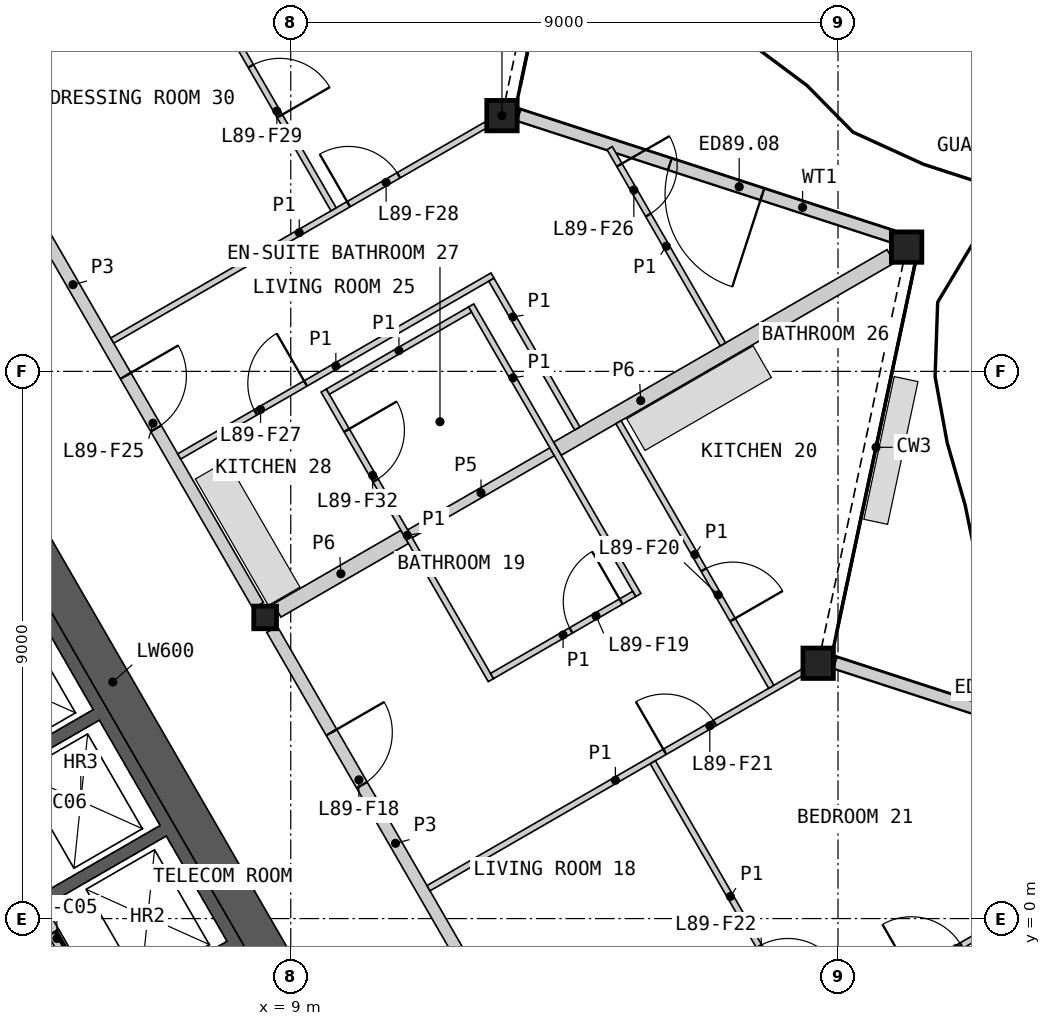
"""IFC4 building model, lengths in metres.
Left out: names, types, materials, properties, quantities, classifications, styles, units other than length and angle.
Written with IfcOpenShell. Run it as: python <this file> out.ifc"""

import sys

from ifc_helpers import new_model, si_unit, direction, frame, frame_2d, origin, origin_2d, place, context, subcontext, project, spatial, polyline, rectangle, hollow_rectangle, i_section, outline, extrude, element, fill, save


model = new_model("IFC4")
c1 = context("Model", 3, precision=1e-05, world=origin(), true_north=direction((0.0, 1.0)))
c2 = subcontext(c1, "Body", "Model", "MODEL_VIEW")
j1 = project(units=[si_unit("LENGTHUNIT", "METRE"), si_unit("PLANEANGLEUNIT", "RADIAN")], contexts=[c1])
p1 = place(None, origin())
s1 = spatial("IfcSite", under=j1, at=p1, CompositionType="ELEMENT")
p2 = place(p1, origin())
s2 = spatial("IfcBuilding", under=s1, at=p2, CompositionType="ELEMENT")
p3 = place(p2, frame((0.0, 0.0, 391.6)))
s3 = spatial("IfcBuildingStorey", under=s2, at=p3, CompositionType="ELEMENT", Elevation=391.6)
for number, where, z_axis, x_axis in (
    (1, (17.674, 4.199, 0.0), (0.0, 0.0, 1.0), (1.0, 0.0, 0.0)),
    (2, (19.129, 11.044, 0.0), (0.0, 0.0, 1.0), (1.0, 0.0, 0.0)),
    (3, (12.474, 13.206, 0.0), (0.0, 0.0, 1.0), (1.0, 0.0, 0.0)),
):
    element("IfcColumn", number, at=place(p3, frame(where, z_axis=z_axis, x_axis=x_axis)), inside=s3, PredefinedType="COLUMN", context=c2, shape_type="SweptSolid", body=[
        extrude(hollow_rectangle(XDim=0.5, YDim=0.5, WallThickness=0.03, at=origin_2d()), origin(), (0.0, 0.0, 1.0), 3.4),
    ])
p4 = place(p3, frame((8.578, 4.953, 0.0), z_axis=(0.0, 0.0, 1.0), x_axis=(1.0, 0.0, 0.0)))
e4 = element("IfcColumn", 4, at=p4, inside=s3, PredefinedType="COLUMN", context=c2, shape_type="SweptSolid", body=[
    extrude(i_section(OverallWidth=0.374, OverallDepth=0.372, WebThickness=0.016, FlangeThickness=0.026, at=origin_2d()), origin(), (0.0, 0.0, 1.0), 3.4),
])
p5 = place(p3, frame((24.174, 2.185, 0.0), z_axis=(0.0, 0.0, 1.0), x_axis=(-0.951061473407, 0.309001737536, 0.0)))
e5 = element("IfcWall", 5, at=p5, inside=s3, PredefinedType="SOLIDWALL", context=c2, shape_type="SweptSolid", body=[
    extrude(rectangle(XDim=6.546, YDim=0.2, at=frame_2d((3.273, 0.0))), origin(), (0.0, 0.0, 1.0), 2.634),
])
p6 = place(p5, frame((2.333, 0.0, 0.0)))
e6 = element("IfcOpeningElement", 6, at=p6, cuts=e5, PredefinedType="OPENING", context=c2, shape_type="SweptSolid", body=[
    extrude(rectangle(XDim=1.6, YDim=2.25, at=frame_2d((0.8, 1.125))), frame((0.0, 0.11, 0.0), z_axis=(0.0, -1.0, 0.0), x_axis=(1.0, 0.0, 0.0)), (0.0, 0.0, 1.0), 0.22),
])
p7 = place(p3, frame((18.974, 11.191, 0.0), z_axis=(0.0, 0.0, 1.0), x_axis=(-0.951057912068, 0.309012698595, 0.0)))
e7 = element("IfcWall", 7, at=p7, inside=s3, PredefinedType="SOLIDWALL", context=c2, shape_type="SweptSolid", body=[
    extrude(rectangle(XDim=6.546, YDim=0.2, at=frame_2d((3.273, 0.0))), origin(), (0.0, 0.0, 1.0), 2.634),
])
p8 = place(p7, frame((2.333, 0.0, 0.0)))
e8 = element("IfcOpeningElement", 8, at=p8, cuts=e7, PredefinedType="OPENING", context=c2, shape_type="SweptSolid", body=[
    extrude(rectangle(XDim=1.6, YDim=2.25, at=frame_2d((0.8, 1.125))), frame((0.0, 0.11, 0.0), z_axis=(0.0, -1.0, 0.0), x_axis=(1.0, 0.0, 0.0)), (0.0, 0.0, 1.0), 0.22),
])
p9 = place(p3, origin())
e9 = element("IfcWall", 9, at=p9, inside=s3, PredefinedType="SHEAR", context=c2, shape_type="SweptSolid", body=[
    extrude(outline(polyline([(1.561, 6.097), (3.731, 7.35), (8.231, -0.444), (6.061, -1.697), (5.96, -1.524), (7.952, -0.374), (6.952, 1.358), (4.96, 0.208), (4.861, 0.381), (6.852, 1.531), (5.852, 3.263), (3.861, 2.113), (3.76, 2.287), (5.752, 3.437), (4.752, 5.169), (2.76, 4.019), (2.66, 4.192), (4.652, 5.342), (3.652, 7.074), (1.66, 5.924), (1.561, 6.097)])), origin(), (0.0, 0.0, 1.0), 3.1),
])
p10 = place(p3, frame((5.817, -1.476, 0.0), z_axis=(0.0, 0.0, 1.0), x_axis=(-0.500002616675, 0.866023893041, 0.0)))
e10 = element("IfcWall", 10, at=p10, inside=s3, PredefinedType="SOLIDWALL", context=c2, shape_type="SweptSolid", body=[
    extrude(rectangle(XDim=8.373, YDim=0.2, at=frame_2d((4.187, 0.0))), origin(), (0.0, 0.0, 1.0), 3.1),
])
p11 = place(p10, frame((0.337, 0.0, 0.0)))
e11 = element("IfcOpeningElement", 11, at=p11, cuts=e10, PredefinedType="OPENING", context=c2, shape_type="SweptSolid", body=[
    extrude(rectangle(XDim=1.1, YDim=2.1, at=frame_2d((0.55, 1.05))), frame((0.0, 0.11, 0.0), z_axis=(0.0, -1.0, 0.0), x_axis=(1.0, 0.0, 0.0)), (0.0, 0.0, 1.0), 0.22),
])
p12 = place(p10, frame((2.537, 0.0, 0.0)))
e12 = element("IfcOpeningElement", 12, at=p12, cuts=e10, PredefinedType="OPENING", context=c2, shape_type="SweptSolid", body=[
    extrude(rectangle(XDim=1.1, YDim=2.1, at=frame_2d((0.55, 1.05))), frame((0.0, 0.11, 0.0), z_axis=(0.0, -1.0, 0.0), x_axis=(1.0, 0.0, 0.0)), (0.0, 0.0, 1.0), 0.22),
])
p13 = place(p10, frame((4.737, 0.0, 0.0)))
e13 = element("IfcOpeningElement", 13, at=p13, cuts=e10, PredefinedType="OPENING", context=c2, shape_type="SweptSolid", body=[
    extrude(rectangle(XDim=1.1, YDim=2.1, at=frame_2d((0.55, 1.05))), frame((0.0, 0.11, 0.0), z_axis=(0.0, -1.0, 0.0), x_axis=(1.0, 0.0, 0.0)), (0.0, 0.0, 1.0), 0.22),
])
p14 = place(p10, frame((7.037, 0.0, 0.0)))
e14 = element("IfcOpeningElement", 14, at=p14, cuts=e10, PredefinedType="OPENING", context=c2, shape_type="SweptSolid", body=[
    extrude(rectangle(XDim=0.9, YDim=2.1, at=frame_2d((0.45, 1.05))), frame((0.0, 0.11, 0.0), z_axis=(0.0, -1.0, 0.0), x_axis=(1.0, 0.0, 0.0)), (0.0, 0.0, 1.0), 0.22),
])
p15 = place(p3, frame((8.686, -0.634, 0.0), z_axis=(0.0, 0.0, 1.0), x_axis=(-0.50001836461, 0.866014800712, 0.0)))
e15 = element("IfcWall", 15, at=p15, inside=s3, PredefinedType="SHEAR", context=c2, shape_type="SweptSolid", body=[
    extrude(rectangle(XDim=10.451, YDim=0.6, at=frame_2d((5.225, 0.0))), origin(), (0.0, 0.0, 1.0), 3.1),
])
p16 = place(p3, frame((4.403, 12.185, 0.0), z_axis=(0.0, 0.0, 1.0), x_axis=(0.499992155518, -0.866029932751, 0.0)))
e16 = element("IfcWall", 16, at=p16, inside=s3, PredefinedType="PARTITIONING", context=c2, shape_type="SweptSolid", body=[
    extrude(rectangle(XDim=8.123, YDim=0.2, at=frame_2d((4.062, 0.0))), origin(), (0.0, 0.0, 1.0), 3.1),
])
p17 = place(p16, frame((3.762, 0.0, 0.0)))
e17 = element("IfcOpeningElement", 17, at=p17, cuts=e16, PredefinedType="OPENING", context=c2, shape_type="SweptSolid", body=[
    extrude(rectangle(XDim=1.0, YDim=2.1, at=frame_2d((0.5, 1.05))), frame((0.0, 0.11, 0.0), z_axis=(0.0, -1.0, 0.0), x_axis=(1.0, 0.0, 0.0)), (0.0, 0.0, 1.0), 0.22),
])
p18 = place(p3, frame((8.692, 4.756, 0.0), z_axis=(0.0, 0.0, 1.0), x_axis=(0.500001682468, -0.866024432409, 0.0)))
e18 = element("IfcWall", 18, at=p18, inside=s3, PredefinedType="PARTITIONING", context=c2, shape_type="SweptSolid", body=[
    extrude(rectangle(XDim=8.124, YDim=0.2, at=frame_2d((4.062, 0.0))), origin(), (0.0, 0.0, 1.0), 3.1),
])
p19 = place(p18, frame((1.956, 0.0, 0.0)))
e19 = element("IfcOpeningElement", 19, at=p19, cuts=e18, PredefinedType="OPENING", context=c2, shape_type="SweptSolid", body=[
    extrude(rectangle(XDim=1.0, YDim=2.1, at=frame_2d((0.5, 1.05))), frame((0.0, 0.11, 0.0), z_axis=(0.0, -1.0, 0.0), x_axis=(1.0, 0.0, 0.0)), (0.0, 0.0, 1.0), 0.22),
])
p20 = place(p3, frame((13.385, 7.728, 0.0), z_axis=(0.0, 0.0, 1.0), x_axis=(0.866023139795, 0.500003921324, 0.0)))
e20 = element("IfcWall", 20, at=p20, inside=s3, PredefinedType="PARTITIONING", context=c2, shape_type="SweptSolid", body=[
    extrude(rectangle(XDim=6.332, YDim=0.25, at=frame_2d((3.166, 0.0))), origin(), (0.0, 0.0, 1.0), 2.33),
])
p21 = place(p3, frame((8.775, 5.066, 0.0), z_axis=(0.0, 0.0, 1.0), x_axis=(0.865989219354, 0.500062668036, 0.0)))
e21 = element("IfcWall", 21, at=p21, inside=s3, PredefinedType="PARTITIONING", context=c2, shape_type="SweptSolid", body=[
    extrude(rectangle(XDim=2.423, YDim=0.25, at=frame_2d((1.211, 0.0))), origin(), (0.0, 0.0, 1.0), 2.33),
])
p22 = place(p3, frame((10.96, 6.328, 0.0), z_axis=(0.0, 0.0, 1.0), x_axis=(0.866059108428, 0.4999416173, 0.0)))
e22 = element("IfcWall", 22, at=p22, inside=s3, PredefinedType="PLUMBINGWALL", context=c2, shape_type="SweptSolid", body=[
    extrude(rectangle(XDim=2.7, YDim=0.15, at=frame_2d((1.35, 0.0))), origin(), (0.0, 0.0, 1.0), 2.33),
])
p23 = place(p3, frame((3.465, 14.01, 0.0), z_axis=(0.0, 0.0, 1.0), x_axis=(0.866032376801, 0.499987922186, 0.0)))
e23 = element("IfcWall", 23, at=p23, inside=s3, PredefinedType="PARTITIONING", context=c2, shape_type="SweptSolid", body=[
    extrude(rectangle(XDim=11.782, YDim=0.1, at=frame_2d((5.891, 0.0))), origin(), (0.0, 0.0, 1.0), 2.33),
])
p24 = place(p23, frame((6.168, 0.0, 0.0)))
e24 = element("IfcOpeningElement", 24, at=p24, cuts=e23, PredefinedType="OPENING", context=c2, shape_type="SweptSolid", body=[
    extrude(rectangle(XDim=0.95, YDim=2.1, at=frame_2d((0.475, 1.05))), frame((0.0, 0.06, 0.0), z_axis=(0.0, -1.0, 0.0), x_axis=(1.0, 0.0, 0.0)), (0.0, 0.0, 1.0), 0.12),
])
p25 = place(p3, frame((13.865, -4.004, 0.0), z_axis=(0.0, 0.0, 1.0), x_axis=(0.866023404247, 0.500003463284, 0.0)))
e25 = element("IfcWall", 25, at=p25, inside=s3, PredefinedType="PARTITIONING", context=c2, shape_type="SweptSolid", body=[
    extrude(rectangle(XDim=11.782, YDim=0.1, at=frame_2d((5.891, 0.0))), origin(), (0.0, 0.0, 1.0), 2.33),
])
p26 = place(p25, frame((6.168, 0.0, 0.0)))
e26 = element("IfcOpeningElement", 26, at=p26, cuts=e25, PredefinedType="OPENING", context=c2, shape_type="SweptSolid", body=[
    extrude(rectangle(XDim=0.95, YDim=2.1, at=frame_2d((0.475, 1.05))), frame((0.0, 0.06, 0.0), z_axis=(0.0, -1.0, 0.0), x_axis=(1.0, 0.0, 0.0)), (0.0, 0.0, 1.0), 0.12),
])
p27 = place(p3, frame((6.065, 9.506, 0.0), z_axis=(0.0, 0.0, 1.0), x_axis=(0.866018949465, 0.500011179042, 0.0)))
e27 = element("IfcWall", 27, at=p27, inside=s3, PredefinedType="PARTITIONING", context=c2, shape_type="SweptSolid", body=[
    extrude(rectangle(XDim=7.1, YDim=0.1, at=frame_2d((3.55, 0.0))), origin(), (0.0, 0.0, 1.0), 2.33),
])
p28 = place(p27, frame((4.488, 0.0, 0.0)))
e28 = element("IfcOpeningElement", 28, at=p28, cuts=e27, PredefinedType="OPENING", context=c2, shape_type="SweptSolid", body=[
    extrude(rectangle(XDim=0.95, YDim=2.1, at=frame_2d((0.475, 1.05))), frame((0.0, 0.06, 0.0), z_axis=(0.0, -1.0, 0.0), x_axis=(1.0, 0.0, 0.0)), (0.0, 0.0, 1.0), 0.12),
])
p29 = place(p3, frame((11.265, 0.5, 0.0), z_axis=(0.0, 0.0, 1.0), x_axis=(0.866033839264, 0.499985389037, 0.0)))
e29 = element("IfcWall", 29, at=p29, inside=s3, PredefinedType="PARTITIONING", context=c2, shape_type="SweptSolid", body=[
    extrude(rectangle(XDim=7.1, YDim=0.1, at=frame_2d((3.55, 0.0))), origin(), (0.0, 0.0, 1.0), 2.33),
])
p30 = place(p29, frame((4.488, 0.0, 0.0)))
e30 = element("IfcOpeningElement", 30, at=p30, cuts=e29, PredefinedType="OPENING", context=c2, shape_type="SweptSolid", body=[
    extrude(rectangle(XDim=0.95, YDim=2.1, at=frame_2d((0.475, 1.05))), frame((0.0, 0.06, 0.0), z_axis=(0.0, -1.0, 0.0), x_axis=(1.0, 0.0, 0.0)), (0.0, 0.0, 1.0), 0.12),
])
p31 = place(p3, frame((7.165, 7.601, 0.0), z_axis=(0.0, 0.0, 1.0), x_axis=(0.866017493347, 0.500013701029, 0.0)))
e31 = element("IfcWall", 31, at=p31, inside=s3, PredefinedType="PARTITIONING", context=c2, shape_type="SweptSolid", body=[
    extrude(rectangle(XDim=5.95, YDim=0.1, at=frame_2d((2.975, 0.0))), origin(), (0.0, 0.0, 1.0), 2.33),
])
p32 = place(p31, frame((1.45, 0.0, 0.0)))
e32 = element("IfcOpeningElement", 32, at=p32, cuts=e31, PredefinedType="OPENING", context=c2, shape_type="SweptSolid", body=[
    extrude(rectangle(XDim=0.95, YDim=2.1, at=frame_2d((0.475, 1.05))), frame((0.0, 0.06, 0.0), z_axis=(0.0, -1.0, 0.0), x_axis=(1.0, 0.0, 0.0)), (0.0, 0.0, 1.0), 0.12),
])
p33 = place(p3, frame((11.967, 10.084, 0.0), z_axis=(0.0, 0.0, 1.0), x_axis=(0.500015767406, -0.866016300277, 0.0)))
e33 = element("IfcWall", 33, at=p33, inside=s3, PredefinedType="PARTITIONING", context=c2, shape_type="SweptSolid", body=[
    extrude(rectangle(XDim=5.5, YDim=0.1, at=frame_2d((2.75, 0.0))), origin(), (0.0, 0.0, 1.0), 2.33),
])
p34 = place(p3, frame((9.542, 8.684, 0.0), z_axis=(0.0, 0.0, 1.0), x_axis=(0.499996545922, -0.866027397988, 0.0)))
e34 = element("IfcWall", 34, at=p34, inside=s3, PredefinedType="PARTITIONING", context=c2, shape_type="SweptSolid", body=[
    extrude(rectangle(XDim=5.5, YDim=0.1, at=frame_2d((2.75, 0.0))), origin(), (0.0, 0.0, 1.0), 2.33),
])
p35 = place(p34, frame((0.756, 0.0, 0.0)))
e35 = element("IfcOpeningElement", 35, at=p35, cuts=e34, PredefinedType="OPENING", context=c2, shape_type="SweptSolid", body=[
    extrude(rectangle(XDim=0.95, YDim=2.1, at=frame_2d((0.475, 1.05))), frame((0.0, 0.06, 0.0), z_axis=(0.0, -1.0, 0.0), x_axis=(1.0, 0.0, 0.0)), (0.0, 0.0, 1.0), 0.12),
])
p36 = place(p3, frame((14.39, 8.164, 0.0), z_axis=(0.0, 0.0, 1.0), x_axis=(0.499990214365, -0.86603105345, 0.0)))
e36 = element("IfcWall", 36, at=p36, inside=s3, PredefinedType="PARTITIONING", context=c2, shape_type="SweptSolid", body=[
    extrude(rectangle(XDim=5.025, YDim=0.1, at=frame_2d((2.512, 0.0))), origin(), (0.0, 0.0, 1.0), 2.33),
])
p37 = place(p36, frame((2.803, 0.0, 0.0)))
e37 = element("IfcOpeningElement", 37, at=p37, cuts=e36, PredefinedType="OPENING", context=c2, shape_type="SweptSolid", body=[
    extrude(rectangle(XDim=0.95, YDim=2.1, at=frame_2d((0.475, 1.05))), frame((0.0, 0.06, 0.0), z_axis=(0.0, -1.0, 0.0), x_axis=(1.0, 0.0, 0.0)), (0.0, 0.0, 1.0), 0.12),
])
p38 = place(p3, frame((7.154, 16.082, 0.0), z_axis=(0.0, 0.0, 1.0), x_axis=(0.499984882974, -0.866034131428, 0.0)))
e38 = element("IfcWall", 38, at=p38, inside=s3, PredefinedType="PARTITIONING", context=c2, shape_type="SweptSolid", body=[
    extrude(rectangle(XDim=5.1, YDim=0.1, at=frame_2d((2.55, 0.0))), origin(), (0.0, 0.0, 1.0), 2.33),
])
p39 = place(p38, frame((2.379, 0.0, 0.0)))
e39 = element("IfcOpeningElement", 39, at=p39, cuts=e38, PredefinedType="OPENING", context=c2, shape_type="SweptSolid", body=[
    extrude(rectangle(XDim=0.95, YDim=2.1, at=frame_2d((0.475, 1.05))), frame((0.0, 0.06, 0.0), z_axis=(0.0, -1.0, 0.0), x_axis=(1.0, 0.0, 0.0)), (0.0, 0.0, 1.0), 0.12),
])
p40 = place(p3, frame((14.954, 2.572, 0.0), z_axis=(0.0, 0.0, 1.0), x_axis=(0.499984882974, -0.866034131428, 0.0)))
e40 = element("IfcWall", 40, at=p40, inside=s3, PredefinedType="PARTITIONING", context=c2, shape_type="SweptSolid", body=[
    extrude(rectangle(XDim=5.1, YDim=0.1, at=frame_2d((2.55, 0.0))), origin(), (0.0, 0.0, 1.0), 2.33),
])
p41 = place(p40, frame((3.494, 0.0, 0.0)))
e41 = element("IfcOpeningElement", 41, at=p41, cuts=e40, PredefinedType="OPENING", context=c2, shape_type="SweptSolid", body=[
    extrude(rectangle(XDim=0.95, YDim=2.1, at=frame_2d((0.475, 1.05))), frame((0.0, 0.06, 0.0), z_axis=(0.0, -1.0, 0.0), x_axis=(1.0, 0.0, 0.0)), (0.0, 0.0, 1.0), 0.12),
])
p42 = place(p3, frame((14.244, 12.672, 0.0), z_axis=(0.0, 0.0, 1.0), x_axis=(0.500021098671, -0.866013222118, 0.0)))
e42 = element("IfcWall", 42, at=p42, inside=s3, PredefinedType="PARTITIONING", context=c2, shape_type="SweptSolid", body=[
    extrude(rectangle(XDim=3.727, YDim=0.1, at=frame_2d((1.863, 0.0))), origin(), (0.0, 0.0, 1.0), 2.33),
])
p43 = place(p42, frame((0.321, 0.0, 0.0)))
e43 = element("IfcOpeningElement", 43, at=p43, cuts=e42, PredefinedType="OPENING", context=c2, shape_type="SweptSolid", body=[
    extrude(rectangle(XDim=0.95, YDim=2.1, at=frame_2d((0.475, 1.05))), frame((0.0, 0.06, 0.0), z_axis=(0.0, -1.0, 0.0), x_axis=(1.0, 0.0, 0.0)), (0.0, 0.0, 1.0), 0.12),
])
p44 = place(p3, frame((12.3, 10.508, 0.0), z_axis=(0.0, 0.0, 1.0), x_axis=(0.500024172624, -0.866011447264, 0.0)))
e44 = element("IfcWall", 44, at=p44, inside=s3, PredefinedType="PARTITIONING", context=c2, shape_type="SweptSolid", body=[
    extrude(rectangle(XDim=2.825, YDim=0.1, at=frame_2d((1.413, 0.0))), origin(), (0.0, 0.0, 1.0), 2.33),
])
p45 = place(p3, frame((9.61, 8.666, 0.0), z_axis=(0.0, 0.0, 1.0), x_axis=(0.86599734893, 0.500048589285, 0.0)))
e45 = element("IfcWall", 45, at=p45, inside=s3, PredefinedType="PARTITIONING", context=c2, shape_type="SweptSolid", body=[
    extrude(rectangle(XDim=2.7, YDim=0.1, at=frame_2d((1.35, 0.0))), origin(), (0.0, 0.0, 1.0), 2.33),
])
p46 = place(p3, frame((12.31, 3.99, 0.0), z_axis=(0.0, 0.0, 1.0), x_axis=(0.86599734893, 0.500048589285, 0.0)))
e46 = element("IfcWall", 46, at=p46, inside=s3, PredefinedType="PARTITIONING", context=c2, shape_type="SweptSolid", body=[
    extrude(rectangle(XDim=2.7, YDim=0.1, at=frame_2d((1.35, 0.0))), origin(), (0.0, 0.0, 1.0), 2.33),
])
p47 = place(p46, frame((1.5, 0.0, 0.0)))
e47 = element("IfcOpeningElement", 47, at=p47, cuts=e46, PredefinedType="OPENING", context=c2, shape_type="SweptSolid", body=[
    extrude(rectangle(XDim=0.95, YDim=2.1, at=frame_2d((0.475, 1.05))), frame((0.0, 0.06, 0.0), z_axis=(0.0, -1.0, 0.0), x_axis=(1.0, 0.0, 0.0)), (0.0, 0.0, 1.0), 0.12),
])
p48 = place(p8, origin())
e48 = element("IfcDoor", 48, at=p48, inside=s3, OperationType="DOUBLE_DOOR_SINGLE_SWING", PredefinedType="DOOR", context=c2, shape_type="SweptSolid", body=[
    extrude(rectangle(XDim=1.6, YDim=2.25, at=frame_2d((0.8, 1.125))), frame((0.0, 0.025, 0.0), z_axis=(0.0, -1.0, 0.0), x_axis=(1.0, 0.0, 0.0)), (0.0, 0.0, 1.0), 0.05),
])
fill(e8, e48)
p49 = place(p11, origin())
e49 = element("IfcDoor", 49, at=p49, inside=s3, OperationType="SLIDING_TO_LEFT", PredefinedType="DOOR", context=c2, shape_type="SweptSolid", body=[
    extrude(rectangle(XDim=1.1, YDim=2.1, at=frame_2d((0.55, 1.05))), frame((0.0, 0.025, 0.0), z_axis=(0.0, -1.0, 0.0), x_axis=(1.0, 0.0, 0.0)), (0.0, 0.0, 1.0), 0.05),
])
fill(e11, e49)
p50 = place(p19, origin())
e50 = element("IfcDoor", 50, at=p50, inside=s3, OperationType="SINGLE_SWING_LEFT", PredefinedType="DOOR", context=c2, shape_type="SweptSolid", body=[
    extrude(rectangle(XDim=1.0, YDim=2.1, at=frame_2d((0.5, 1.05))), frame((0.0, 0.025, 0.0), z_axis=(0.0, -1.0, 0.0), x_axis=(1.0, 0.0, 0.0)), (0.0, 0.0, 1.0), 0.05),
])
fill(e19, e50)
p51 = place(p47, origin())
e51 = element("IfcDoor", 51, at=p51, inside=s3, OperationType="SINGLE_SWING_RIGHT", PredefinedType="DOOR", context=c2, shape_type="SweptSolid", body=[
    extrude(rectangle(XDim=0.95, YDim=2.1, at=frame_2d((0.475, 1.05))), frame((0.0, 0.025, 0.0), z_axis=(0.0, -1.0, 0.0), x_axis=(1.0, 0.0, 0.0)), (0.0, 0.0, 1.0), 0.05),
])
fill(e47, e51)
p52 = place(p37, origin())
e52 = element("IfcDoor", 52, at=p52, inside=s3, OperationType="SINGLE_SWING_RIGHT", PredefinedType="DOOR", context=c2, shape_type="SweptSolid", body=[
    extrude(rectangle(XDim=0.95, YDim=2.1, at=frame_2d((0.475, 1.05))), frame((0.0, 0.025, 0.0), z_axis=(0.0, -1.0, 0.0), x_axis=(1.0, 0.0, 0.0)), (0.0, 0.0, 1.0), 0.05),
])
fill(e37, e52)
p53 = place(p30, origin())
e53 = element("IfcDoor", 53, at=p53, inside=s3, OperationType="SINGLE_SWING_LEFT", PredefinedType="DOOR", context=c2, shape_type="SweptSolid", body=[
    extrude(rectangle(XDim=0.95, YDim=2.1, at=frame_2d((0.475, 1.05))), frame((0.0, 0.025, 0.0), z_axis=(0.0, -1.0, 0.0), x_axis=(1.0, 0.0, 0.0)), (0.0, 0.0, 1.0), 0.05),
])
fill(e30, e53)
p54 = place(p41, origin())
e54 = element("IfcDoor", 54, at=p54, inside=s3, OperationType="SINGLE_SWING_RIGHT", PredefinedType="DOOR", context=c2, shape_type="SweptSolid", body=[
    extrude(rectangle(XDim=0.95, YDim=2.1, at=frame_2d((0.475, 1.05))), frame((0.0, 0.025, 0.0), z_axis=(0.0, -1.0, 0.0), x_axis=(1.0, 0.0, 0.0)), (0.0, 0.0, 1.0), 0.05),
])
fill(e41, e54)
p55 = place(p26, origin())
e55 = element("IfcDoor", 55, at=p55, inside=s3, OperationType="SINGLE_SWING_LEFT", PredefinedType="DOOR", context=c2, shape_type="SweptSolid", body=[
    extrude(rectangle(XDim=0.95, YDim=2.1, at=frame_2d((0.475, 1.05))), frame((0.0, 0.025, 0.0), z_axis=(0.0, -1.0, 0.0), x_axis=(1.0, 0.0, 0.0)), (0.0, 0.0, 1.0), 0.05),
])
fill(e26, e55)
p56 = place(p17, origin())
e56 = element("IfcDoor", 56, at=p56, inside=s3, OperationType="SINGLE_SWING_LEFT", PredefinedType="DOOR", context=c2, shape_type="SweptSolid", body=[
    extrude(rectangle(XDim=1.0, YDim=2.1, at=frame_2d((0.5, 1.05))), frame((0.0, 0.025, 0.0), z_axis=(0.0, -1.0, 0.0), x_axis=(1.0, 0.0, 0.0)), (0.0, 0.0, 1.0), 0.05),
])
fill(e17, e56)
p57 = place(p43, origin())
e57 = element("IfcDoor", 57, at=p57, inside=s3, OperationType="SINGLE_SWING_LEFT", PredefinedType="DOOR", context=c2, shape_type="SweptSolid", body=[
    extrude(rectangle(XDim=0.95, YDim=2.1, at=frame_2d((0.475, 1.05))), frame((0.0, 0.025, 0.0), z_axis=(0.0, -1.0, 0.0), x_axis=(1.0, 0.0, 0.0)), (0.0, 0.0, 1.0), 0.05),
])
fill(e43, e57)
p58 = place(p32, origin())
e58 = element("IfcDoor", 58, at=p58, inside=s3, OperationType="SINGLE_SWING_RIGHT", PredefinedType="DOOR", context=c2, shape_type="SweptSolid", body=[
    extrude(rectangle(XDim=0.95, YDim=2.1, at=frame_2d((0.475, 1.05))), frame((0.0, 0.025, 0.0), z_axis=(0.0, -1.0, 0.0), x_axis=(1.0, 0.0, 0.0)), (0.0, 0.0, 1.0), 0.05),
])
fill(e32, e58)
p59 = place(p28, origin())
e59 = element("IfcDoor", 59, at=p59, inside=s3, OperationType="SINGLE_SWING_LEFT", PredefinedType="DOOR", context=c2, shape_type="SweptSolid", body=[
    extrude(rectangle(XDim=0.95, YDim=2.1, at=frame_2d((0.475, 1.05))), frame((0.0, 0.025, 0.0), z_axis=(0.0, -1.0, 0.0), x_axis=(1.0, 0.0, 0.0)), (0.0, 0.0, 1.0), 0.05),
])
fill(e28, e59)
p60 = place(p39, origin())
e60 = element("IfcDoor", 60, at=p60, inside=s3, OperationType="SINGLE_SWING_RIGHT", PredefinedType="DOOR", context=c2, shape_type="SweptSolid", body=[
    extrude(rectangle(XDim=0.95, YDim=2.1, at=frame_2d((0.475, 1.05))), frame((0.0, 0.025, 0.0), z_axis=(0.0, -1.0, 0.0), x_axis=(1.0, 0.0, 0.0)), (0.0, 0.0, 1.0), 0.05),
])
fill(e39, e60)
p61 = place(p35, origin())
e61 = element("IfcDoor", 61, at=p61, inside=s3, OperationType="SINGLE_SWING_LEFT", PredefinedType="DOOR", context=c2, shape_type="SweptSolid", body=[
    extrude(rectangle(XDim=0.95, YDim=2.1, at=frame_2d((0.475, 1.05))), frame((0.0, 0.025, 0.0), z_axis=(0.0, -1.0, 0.0), x_axis=(1.0, 0.0, 0.0)), (0.0, 0.0, 1.0), 0.05),
])
fill(e35, e61)
save(model, sys.argv[1])
